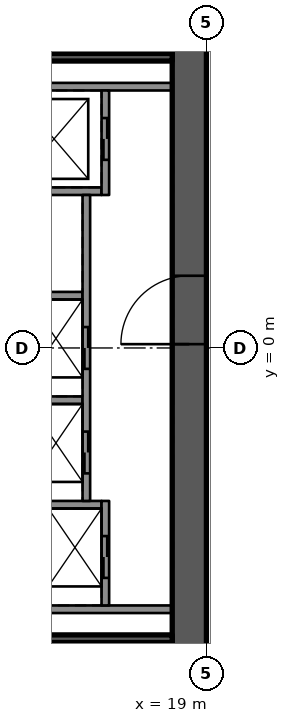
"""IFC4 building model, lengths in metres.
Left out: names, types, materials, properties, quantities, classifications, styles, units other than length and angle.
Written with IfcOpenShell. Run it as: python <this file> out.ifc"""

import sys

from ifc_helpers import new_model, si_unit, direction, frame, frame_2d, origin, place, context, subcontext, project, spatial, rectangle, extrude, element, fill, save


model = new_model("IFC4")
c1 = context("Model", 3, precision=1e-05, world=origin(), true_north=direction((0.0, 1.0)))
c2 = subcontext(c1, "Body", "Model", "MODEL_VIEW")
j1 = project(units=[si_unit("LENGTHUNIT", "METRE"), si_unit("PLANEANGLEUNIT", "RADIAN")], contexts=[c1])
p1 = place(None, origin())
s1 = spatial("IfcSite", under=j1, at=p1, CompositionType="ELEMENT")
p2 = place(p1, origin())
s2 = spatial("IfcBuilding", under=s1, at=p2, CompositionType="ELEMENT")
p3 = place(p2, frame((0.0, 0.0, 10.5)))
s3 = spatial("IfcBuildingStorey", under=s2, at=p3, CompositionType="ELEMENT", Elevation=10.5)
p4 = place(p3, frame((18.55, -12.0, 0.0), z_axis=(0.0, 0.0, 1.0), x_axis=(0.0, 1.0, 0.0)))
e1 = element("IfcWall", 1, at=p4, inside=s3, PredefinedType="SHEAR", context=c2, shape_type="SweptSolid", body=[
    extrude(rectangle(XDim=24.0, YDim=0.9, at=frame_2d((12.0, 0.0))), origin(), (0.0, 0.0, 1.0), 5.0),
])
p5 = place(p4, frame((12.1, 0.0, 0.0)))
e2 = element("IfcOpeningElement", 2, at=p5, cuts=e1, PredefinedType="OPENING", context=c2, shape_type="SweptSolid", body=[
    extrude(rectangle(XDim=1.8, YDim=2.1, at=frame_2d((0.9, 1.05))), frame((0.0, 0.46, 0.0), z_axis=(0.0, -1.0, 0.0), x_axis=(1.0, 0.0, 0.0)), (0.0, 0.0, 1.0), 0.92),
])
for number, where, z_axis, x_axis in (
    (3, (11.54, -6.875, 0.0), (0.0, 0.0, 1.0), (1.0, 0.0, 0.0)),
    (4, (11.54, 6.875, 0.0), (0.0, 0.0, 1.0), (1.0, 0.0, 0.0)),
):
    element("IfcWall", number, at=place(p3, frame(where, z_axis=z_axis, x_axis=x_axis)), inside=s3, PredefinedType="SOLIDWALL", context=c2, shape_type="SweptSolid", body=[
        extrude(rectangle(XDim=6.56, YDim=0.2, at=frame_2d((3.28, 0.0))), origin(), (0.0, 0.0, 1.0), 4.59),
    ])
p6 = place(p3, frame((11.54, 4.125, 0.0), z_axis=(0.0, 0.0, 1.0), x_axis=(1.0, 0.0, 0.0)))
e5 = element("IfcWall", 5, at=p6, inside=s3, PredefinedType="SOLIDWALL", context=c2, shape_type="SweptSolid", body=[
    extrude(rectangle(XDim=4.7, YDim=0.2, at=frame_2d((2.35, 0.0))), origin(), (0.0, 0.0, 1.0), 4.59),
])
for number, where, z_axis, x_axis in (
    (6, (11.54, 1.375, 0.0), (0.0, 0.0, 1.0), (1.0, 0.0, 0.0)),
    (7, (11.54, -1.375, 0.0), (0.0, 0.0, 1.0), (1.0, 0.0, 0.0)),
):
    element("IfcWall", number, at=place(p3, frame(where, z_axis=z_axis, x_axis=x_axis)), inside=s3, PredefinedType="SOLIDWALL", context=c2, shape_type="SweptSolid", body=[
        extrude(rectangle(XDim=4.2, YDim=0.2, at=frame_2d((2.1, 0.0))), origin(), (0.0, 0.0, 1.0), 4.59),
    ])
p7 = place(p3, frame((11.54, -4.125, 0.0), z_axis=(0.0, 0.0, 1.0), x_axis=(1.0, 0.0, 0.0)))
e8 = element("IfcWall", 8, at=p7, inside=s3, PredefinedType="SOLIDWALL", context=c2, shape_type="SweptSolid", body=[
    extrude(rectangle(XDim=4.7, YDim=0.2, at=frame_2d((2.35, 0.0))), origin(), (0.0, 0.0, 1.0), 4.59),
])
p8 = place(p3, frame((16.34, 6.775, 0.0), z_axis=(0.0, 0.0, 1.0), x_axis=(0.0, -1.0, 0.0)))
e9 = element("IfcWall", 9, at=p8, inside=s3, PredefinedType="SOLIDWALL", context=c2, shape_type="SweptSolid", body=[
    extrude(rectangle(XDim=2.75, YDim=0.2, at=frame_2d((1.375, 0.0))), origin(), (0.0, 0.0, 1.0), 4.59),
])
p9 = place(p8, frame((0.725, 0.0, 0.0)))
e10 = element("IfcOpeningElement", 10, at=p9, cuts=e9, PredefinedType="OPENING", context=c2, shape_type="SweptSolid", body=[
    extrude(rectangle(XDim=1.1, YDim=2.1, at=frame_2d((0.55, 1.05))), frame((0.0, 0.11, 0.0), z_axis=(0.0, -1.0, 0.0), x_axis=(1.0, 0.0, 0.0)), (0.0, 0.0, 1.0), 0.22),
])
p10 = place(p3, frame((15.84, 4.025, 0.0), z_axis=(0.0, 0.0, 1.0), x_axis=(0.0, -1.0, 0.0)))
e11 = element("IfcWall", 11, at=p10, inside=s3, PredefinedType="SOLIDWALL", context=c2, shape_type="SweptSolid", body=[
    extrude(rectangle(XDim=8.05, YDim=0.2, at=frame_2d((4.025, 0.0))), origin(), (0.0, 0.0, 1.0), 4.59),
])
p11 = place(p10, frame((3.475, 0.0, 0.0)))
e12 = element("IfcOpeningElement", 12, at=p11, cuts=e11, PredefinedType="OPENING", context=c2, shape_type="SweptSolid", body=[
    extrude(rectangle(XDim=1.1, YDim=2.1, at=frame_2d((0.55, 1.05))), frame((0.0, 0.11, 0.0), z_axis=(0.0, -1.0, 0.0), x_axis=(1.0, 0.0, 0.0)), (0.0, 0.0, 1.0), 0.22),
])
p12 = place(p10, frame((6.225, 0.0, 0.0)))
e13 = element("IfcOpeningElement", 13, at=p12, cuts=e11, PredefinedType="OPENING", context=c2, shape_type="SweptSolid", body=[
    extrude(rectangle(XDim=1.1, YDim=2.1, at=frame_2d((0.55, 1.05))), frame((0.0, 0.11, 0.0), z_axis=(0.0, -1.0, 0.0), x_axis=(1.0, 0.0, 0.0)), (0.0, 0.0, 1.0), 0.22),
])
p13 = place(p3, frame((16.34, -4.025, 0.0), z_axis=(0.0, 0.0, 1.0), x_axis=(0.0, -1.0, 0.0)))
e14 = element("IfcWall", 14, at=p13, inside=s3, PredefinedType="SOLIDWALL", context=c2, shape_type="SweptSolid", body=[
    extrude(rectangle(XDim=2.75, YDim=0.2, at=frame_2d((1.375, 0.0))), origin(), (0.0, 0.0, 1.0), 4.59),
])
p14 = place(p13, frame((0.925, 0.0, 0.0)))
e15 = element("IfcOpeningElement", 15, at=p14, cuts=e14, PredefinedType="OPENING", context=c2, shape_type="SweptSolid", body=[
    extrude(rectangle(XDim=1.1, YDim=2.1, at=frame_2d((0.55, 1.05))), frame((0.0, 0.11, 0.0), z_axis=(0.0, -1.0, 0.0), x_axis=(1.0, 0.0, 0.0)), (0.0, 0.0, 1.0), 0.22),
])
for number, where, z_axis, x_axis in (
    (16, (11.54, -7.65, 0.0), (0.0, 0.0, 1.0), (1.0, 0.0, 0.0)),
    (17, (11.54, 7.65, 0.0), (0.0, 0.0, 1.0), (1.0, 0.0, 0.0)),
):
    element("IfcWall", number, at=place(p3, frame(where, z_axis=z_axis, x_axis=x_axis)), inside=s3, PredefinedType="SOLIDWALL", context=c2, shape_type="SweptSolid", body=[
        extrude(rectangle(XDim=6.56, YDim=0.2, at=frame_2d((3.28, 0.0))), origin(), (0.0, 0.0, 1.0), 4.59),
    ])
p15 = place(p9, origin())
e18 = element("IfcDoor", 18, at=p15, inside=s3, OperationType="DOUBLE_DOOR_SLIDING", PredefinedType="DOOR", context=c2, shape_type="SweptSolid", body=[
    extrude(rectangle(XDim=1.1, YDim=2.1, at=frame_2d((0.55, 1.05))), frame((0.0, 0.025, 0.0), z_axis=(0.0, -1.0, 0.0), x_axis=(1.0, 0.0, 0.0)), (0.0, 0.0, 1.0), 0.05),
])
fill(e10, e18)
p16 = place(p11, origin())
e19 = element("IfcDoor", 19, at=p16, inside=s3, OperationType="DOUBLE_DOOR_SLIDING", PredefinedType="DOOR", context=c2, shape_type="SweptSolid", body=[
    extrude(rectangle(XDim=1.1, YDim=2.1, at=frame_2d((0.55, 1.05))), frame((0.0, 0.025, 0.0), z_axis=(0.0, -1.0, 0.0), x_axis=(1.0, 0.0, 0.0)), (0.0, 0.0, 1.0), 0.05),
])
fill(e12, e19)
p17 = place(p12, origin())
e20 = element("IfcDoor", 20, at=p17, inside=s3, OperationType="DOUBLE_DOOR_SLIDING", PredefinedType="DOOR", context=c2, shape_type="SweptSolid", body=[
    extrude(rectangle(XDim=1.1, YDim=2.1, at=frame_2d((0.55, 1.05))), frame((0.0, 0.025, 0.0), z_axis=(0.0, -1.0, 0.0), x_axis=(1.0, 0.0, 0.0)), (0.0, 0.0, 1.0), 0.05),
])
fill(e13, e20)
p18 = place(p14, origin())
e21 = element("IfcDoor", 21, at=p18, inside=s3, OperationType="DOUBLE_DOOR_SLIDING", PredefinedType="DOOR", context=c2, shape_type="SweptSolid", body=[
    extrude(rectangle(XDim=1.1, YDim=2.1, at=frame_2d((0.55, 1.05))), frame((0.0, 0.025, 0.0), z_axis=(0.0, -1.0, 0.0), x_axis=(1.0, 0.0, 0.0)), (0.0, 0.0, 1.0), 0.05),
])
fill(e15, e21)
p19 = place(p5, origin())
e22 = element("IfcDoor", 22, at=p19, inside=s3, OperationType="SINGLE_SWING_RIGHT", PredefinedType="DOOR", context=c2, shape_type="SweptSolid", body=[
    extrude(rectangle(XDim=1.8, YDim=2.1, at=frame_2d((0.9, 1.05))), frame((0.0, 0.025, 0.0), z_axis=(0.0, -1.0, 0.0), x_axis=(1.0, 0.0, 0.0)), (0.0, 0.0, 1.0), 0.05),
])
fill(e2, e22)
save(model, sys.argv[1])
